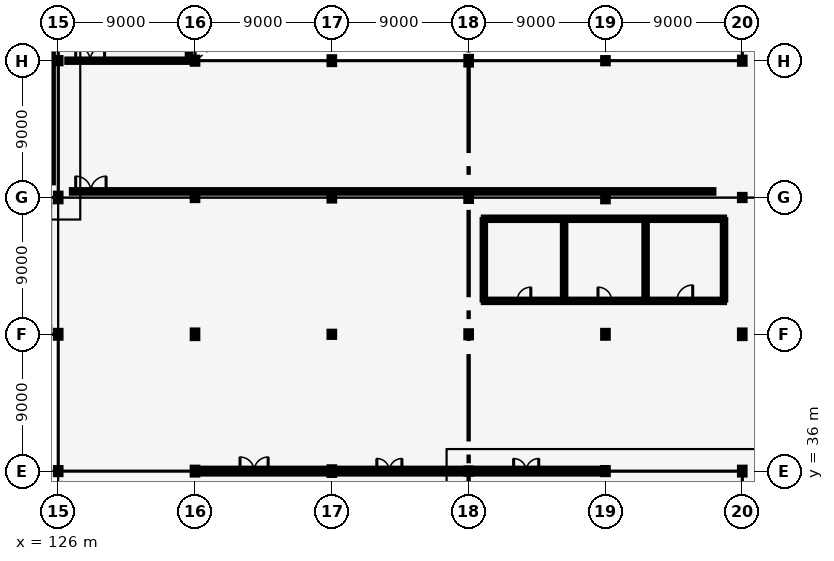
"""IFC4 building model, lengths in metres.
Left out: names, types, materials, properties, quantities, classifications, styles, units other than length and angle.
Written with IfcOpenShell. Run it as: python <this file> out.ifc"""

import sys

from ifc_helpers import new_model, si_unit, direction, frame, frame_2d, origin, origin_2d, place, context, subcontext, project, spatial, rectangle, i_section, extrude, element, fill, save


model = new_model("IFC4")
c1 = context("Model", 3, precision=1e-05, world=origin(), true_north=direction((0.0, 1.0)))
c2 = subcontext(c1, "Body", "Model", "MODEL_VIEW")
j1 = project(units=[si_unit("LENGTHUNIT", "METRE"), si_unit("PLANEANGLEUNIT", "RADIAN")], contexts=[c1])
p1 = place(None, origin())
s1 = spatial("IfcSite", under=j1, at=p1, CompositionType="ELEMENT")
p2 = place(p1, origin())
s2 = spatial("IfcBuilding", under=s1, at=p2, CompositionType="ELEMENT")
p3 = place(p2, frame((0.0, 0.0, 18.0)))
s3 = spatial("IfcBuildingStorey", under=s2, at=p3, CompositionType="ELEMENT", Elevation=18.0)
p4 = place(p3, frame((126.0, 36.0, 0.0), z_axis=(0.0, 0.0, 1.0), x_axis=(1.0, 0.0, 0.0)))
e1 = element("IfcColumn", 1, at=p4, inside=s3, PredefinedType="COLUMN", context=c2, shape_type="SweptSolid", body=[
    extrude(i_section(OverallWidth=0.3, OverallDepth=0.4, WebThickness=0.013, FlangeThickness=0.024, FilletRadius=0.027, at=origin_2d()), origin(), (0.0, 0.0, 1.0), 4.8),
])
p5 = place(p3, frame((126.0, 45.0, 0.0), z_axis=(0.0, 0.0, 1.0), x_axis=(1.0, 0.0, 0.0)))
e2 = element("IfcColumn", 2, at=p5, inside=s3, PredefinedType="COLUMN", context=c2, shape_type="SweptSolid", body=[
    extrude(i_section(OverallWidth=0.3, OverallDepth=0.45, WebThickness=0.014, FlangeThickness=0.026, FilletRadius=0.027, at=origin_2d()), origin(), (0.0, 0.0, 1.0), 4.8),
])
p6 = place(p3, frame((126.0, 54.0, 0.0), z_axis=(0.0, 0.0, 1.0), x_axis=(1.0, 0.0, 0.0)))
e3 = element("IfcColumn", 3, at=p6, inside=s3, PredefinedType="COLUMN", context=c2, shape_type="SweptSolid", body=[
    extrude(i_section(OverallWidth=0.3, OverallDepth=0.5, WebThickness=0.014, FlangeThickness=0.028, FilletRadius=0.027, at=origin_2d()), origin(), (0.0, 0.0, 1.0), 4.8),
])
p7 = place(p3, frame((126.0, 63.0, 0.0), z_axis=(0.0, 0.0, 1.0), x_axis=(1.0, 0.0, 0.0)))
e4 = element("IfcColumn", 4, at=p7, inside=s3, PredefinedType="COLUMN", context=c2, shape_type="SweptSolid", body=[
    extrude(i_section(OverallWidth=0.3, OverallDepth=0.34, WebThickness=0.012, FlangeThickness=0.021, FilletRadius=0.027, at=origin_2d()), origin(), (0.0, 0.0, 1.0), 4.8),
])
p8 = place(p3, frame((135.0, 36.0, 0.0), z_axis=(0.0, 0.0, 1.0), x_axis=(1.0, 0.0, 0.0)))
e5 = element("IfcColumn", 5, at=p8, inside=s3, PredefinedType="COLUMN", context=c2, shape_type="SweptSolid", body=[
    extrude(i_section(OverallWidth=0.3, OverallDepth=0.45, WebThickness=0.014, FlangeThickness=0.026, FilletRadius=0.027, at=origin_2d()), origin(), (0.0, 0.0, 1.0), 4.8),
])
p9 = place(p3, frame((135.0, 45.0, 0.0), z_axis=(0.0, 0.0, 1.0), x_axis=(1.0, 0.0, 0.0)))
e6 = element("IfcColumn", 6, at=p9, inside=s3, PredefinedType="COLUMN", context=c2, shape_type="SweptSolid", body=[
    extrude(i_section(OverallWidth=0.3, OverallDepth=0.5, WebThickness=0.014, FlangeThickness=0.028, FilletRadius=0.027, at=origin_2d()), origin(), (0.0, 0.0, 1.0), 4.8),
])
p10 = place(p3, frame((135.0, 54.0, 0.0), z_axis=(0.0, 0.0, 1.0), x_axis=(1.0, 0.0, 0.0)))
e7 = element("IfcColumn", 7, at=p10, inside=s3, PredefinedType="COLUMN", context=c2, shape_type="SweptSolid", body=[
    extrude(i_section(OverallWidth=0.3, OverallDepth=0.34, WebThickness=0.012, FlangeThickness=0.021, FilletRadius=0.027, at=origin_2d()), origin(), (0.0, 0.0, 1.0), 4.8),
])
p11 = place(p3, frame((135.0, 63.0, 0.0), z_axis=(0.0, 0.0, 1.0), x_axis=(1.0, 0.0, 0.0)))
e8 = element("IfcColumn", 8, at=p11, inside=s3, PredefinedType="COLUMN", context=c2, shape_type="SweptSolid", body=[
    extrude(i_section(OverallWidth=0.3, OverallDepth=0.4, WebThickness=0.013, FlangeThickness=0.024, FilletRadius=0.027, at=origin_2d()), origin(), (0.0, 0.0, 1.0), 4.8),
])
p12 = place(p3, frame((144.0, 36.0, 0.0), z_axis=(0.0, 0.0, 1.0), x_axis=(1.0, 0.0, 0.0)))
e9 = element("IfcColumn", 9, at=p12, inside=s3, PredefinedType="COLUMN", context=c2, shape_type="SweptSolid", body=[
    extrude(i_section(OverallWidth=0.3, OverallDepth=0.5, WebThickness=0.014, FlangeThickness=0.028, FilletRadius=0.027, at=origin_2d()), origin(), (0.0, 0.0, 1.0), 4.8),
])
p13 = place(p3, frame((144.0, 45.0, 0.0), z_axis=(0.0, 0.0, 1.0), x_axis=(1.0, 0.0, 0.0)))
e10 = element("IfcColumn", 10, at=p13, inside=s3, PredefinedType="COLUMN", context=c2, shape_type="SweptSolid", body=[
    extrude(i_section(OverallWidth=0.3, OverallDepth=0.34, WebThickness=0.012, FlangeThickness=0.021, FilletRadius=0.027, at=origin_2d()), origin(), (0.0, 0.0, 1.0), 4.8),
])
p14 = place(p3, frame((144.0, 54.0, 0.0), z_axis=(0.0, 0.0, 1.0), x_axis=(1.0, 0.0, 0.0)))
e11 = element("IfcColumn", 11, at=p14, inside=s3, PredefinedType="COLUMN", context=c2, shape_type="SweptSolid", body=[
    extrude(i_section(OverallWidth=0.3, OverallDepth=0.4, WebThickness=0.013, FlangeThickness=0.024, FilletRadius=0.027, at=origin_2d()), origin(), (0.0, 0.0, 1.0), 4.8),
])
p15 = place(p3, frame((144.0, 63.0, 0.0), z_axis=(0.0, 0.0, 1.0), x_axis=(1.0, 0.0, 0.0)))
e12 = element("IfcColumn", 12, at=p15, inside=s3, PredefinedType="COLUMN", context=c2, shape_type="SweptSolid", body=[
    extrude(i_section(OverallWidth=0.3, OverallDepth=0.45, WebThickness=0.014, FlangeThickness=0.026, FilletRadius=0.027, at=origin_2d()), origin(), (0.0, 0.0, 1.0), 4.8),
])
p16 = place(p3, frame((153.0, 36.0, 0.0), z_axis=(0.0, 0.0, 1.0), x_axis=(1.0, 0.0, 0.0)))
e13 = element("IfcColumn", 13, at=p16, inside=s3, PredefinedType="COLUMN", context=c2, shape_type="SweptSolid", body=[
    extrude(i_section(OverallWidth=0.3, OverallDepth=0.34, WebThickness=0.012, FlangeThickness=0.021, FilletRadius=0.027, at=origin_2d()), origin(), (0.0, 0.0, 1.0), 4.8),
])
p17 = place(p3, frame((153.0, 45.0, 0.0), z_axis=(0.0, 0.0, 1.0), x_axis=(1.0, 0.0, 0.0)))
e14 = element("IfcColumn", 14, at=p17, inside=s3, PredefinedType="COLUMN", context=c2, shape_type="SweptSolid", body=[
    extrude(i_section(OverallWidth=0.3, OverallDepth=0.4, WebThickness=0.013, FlangeThickness=0.024, FilletRadius=0.027, at=origin_2d()), origin(), (0.0, 0.0, 1.0), 4.8),
])
p18 = place(p3, frame((153.0, 54.0, 0.0), z_axis=(0.0, 0.0, 1.0), x_axis=(1.0, 0.0, 0.0)))
e15 = element("IfcColumn", 15, at=p18, inside=s3, PredefinedType="COLUMN", context=c2, shape_type="SweptSolid", body=[
    extrude(i_section(OverallWidth=0.3, OverallDepth=0.45, WebThickness=0.014, FlangeThickness=0.026, FilletRadius=0.027, at=origin_2d()), origin(), (0.0, 0.0, 1.0), 4.8),
])
p19 = place(p3, frame((153.0, 63.0, 0.0), z_axis=(0.0, 0.0, 1.0), x_axis=(1.0, 0.0, 0.0)))
e16 = element("IfcColumn", 16, at=p19, inside=s3, PredefinedType="COLUMN", context=c2, shape_type="SweptSolid", body=[
    extrude(i_section(OverallWidth=0.3, OverallDepth=0.5, WebThickness=0.014, FlangeThickness=0.028, FilletRadius=0.027, at=origin_2d()), origin(), (0.0, 0.0, 1.0), 4.8),
])
p20 = place(p3, frame((162.0, 36.0, 0.0), z_axis=(0.0, 0.0, 1.0), x_axis=(1.0, 0.0, 0.0)))
e17 = element("IfcColumn", 17, at=p20, inside=s3, PredefinedType="COLUMN", context=c2, shape_type="SweptSolid", body=[
    extrude(i_section(OverallWidth=0.3, OverallDepth=0.4, WebThickness=0.013, FlangeThickness=0.024, FilletRadius=0.027, at=origin_2d()), origin(), (0.0, 0.0, 1.0), 4.8),
])
p21 = place(p3, frame((162.0, 45.0, 0.0), z_axis=(0.0, 0.0, 1.0), x_axis=(1.0, 0.0, 0.0)))
e18 = element("IfcColumn", 18, at=p21, inside=s3, PredefinedType="COLUMN", context=c2, shape_type="SweptSolid", body=[
    extrude(i_section(OverallWidth=0.3, OverallDepth=0.45, WebThickness=0.014, FlangeThickness=0.026, FilletRadius=0.027, at=origin_2d()), origin(), (0.0, 0.0, 1.0), 4.8),
])
p22 = place(p3, frame((162.0, 54.0, 0.0), z_axis=(0.0, 0.0, 1.0), x_axis=(1.0, 0.0, 0.0)))
e19 = element("IfcColumn", 19, at=p22, inside=s3, PredefinedType="COLUMN", context=c2, shape_type="SweptSolid", body=[
    extrude(i_section(OverallWidth=0.3, OverallDepth=0.5, WebThickness=0.014, FlangeThickness=0.028, FilletRadius=0.027, at=origin_2d()), origin(), (0.0, 0.0, 1.0), 4.8),
])
p23 = place(p3, frame((162.0, 63.0, 0.0), z_axis=(0.0, 0.0, 1.0), x_axis=(1.0, 0.0, 0.0)))
e20 = element("IfcColumn", 20, at=p23, inside=s3, PredefinedType="COLUMN", context=c2, shape_type="SweptSolid", body=[
    extrude(i_section(OverallWidth=0.3, OverallDepth=0.34, WebThickness=0.012, FlangeThickness=0.021, FilletRadius=0.027, at=origin_2d()), origin(), (0.0, 0.0, 1.0), 4.8),
])
p24 = place(p3, frame((171.0, 36.0, 0.0), z_axis=(0.0, 0.0, 1.0), x_axis=(1.0, 0.0, 0.0)))
e21 = element("IfcColumn", 21, at=p24, inside=s3, PredefinedType="COLUMN", context=c2, shape_type="SweptSolid", body=[
    extrude(i_section(OverallWidth=0.3, OverallDepth=0.45, WebThickness=0.014, FlangeThickness=0.026, FilletRadius=0.027, at=origin_2d()), origin(), (0.0, 0.0, 1.0), 4.8),
])
p25 = place(p3, frame((171.0, 45.0, 0.0), z_axis=(0.0, 0.0, 1.0), x_axis=(1.0, 0.0, 0.0)))
e22 = element("IfcColumn", 22, at=p25, inside=s3, PredefinedType="COLUMN", context=c2, shape_type="SweptSolid", body=[
    extrude(i_section(OverallWidth=0.3, OverallDepth=0.5, WebThickness=0.014, FlangeThickness=0.028, FilletRadius=0.027, at=origin_2d()), origin(), (0.0, 0.0, 1.0), 4.8),
])
p26 = place(p3, frame((171.0, 54.0, 0.0), z_axis=(0.0, 0.0, 1.0), x_axis=(1.0, 0.0, 0.0)))
e23 = element("IfcColumn", 23, at=p26, inside=s3, PredefinedType="COLUMN", context=c2, shape_type="SweptSolid", body=[
    extrude(i_section(OverallWidth=0.3, OverallDepth=0.34, WebThickness=0.012, FlangeThickness=0.021, FilletRadius=0.027, at=origin_2d()), origin(), (0.0, 0.0, 1.0), 4.8),
])
p27 = place(p3, frame((171.0, 63.0, 0.0), z_axis=(0.0, 0.0, 1.0), x_axis=(1.0, 0.0, 0.0)))
e24 = element("IfcColumn", 24, at=p27, inside=s3, PredefinedType="COLUMN", context=c2, shape_type="SweptSolid", body=[
    extrude(i_section(OverallWidth=0.3, OverallDepth=0.4, WebThickness=0.013, FlangeThickness=0.024, FilletRadius=0.027, at=origin_2d()), origin(), (0.0, 0.0, 1.0), 4.8),
])
p28 = place(p3, frame((135.145, 36.0, 0.0), z_axis=(0.0, 0.0, 1.0), x_axis=(1.0, 0.0, 0.0)))
e25 = element("IfcWall", 25, at=p28, inside=s3, PredefinedType="SOLIDWALL", context=c2, shape_type="SweptSolid", body=[
    extrude(rectangle(XDim=8.71, YDim=0.32, at=frame_2d((4.355, 0.0))), origin(), (0.0, 0.0, 1.0), 3.65),
])
p29 = place(p28, frame((2.815, 0.0, 0.0)))
e26 = element("IfcOpeningElement", 26, at=p29, cuts=e25, PredefinedType="OPENING", context=c2, shape_type="SweptSolid", body=[
    extrude(rectangle(XDim=1.85, YDim=2.3, at=frame_2d((0.925, 1.15))), frame((0.0, 0.17, 0.0), z_axis=(0.0, -1.0, 0.0), x_axis=(1.0, 0.0, 0.0)), (0.0, 0.0, 1.0), 0.34),
])
p30 = place(p28, frame((5.415, 0.0, 0.85)))
e27 = element("IfcOpeningElement", 27, at=p30, cuts=e25, PredefinedType="OPENING", context=c2, shape_type="SweptSolid", body=[
    extrude(rectangle(XDim=1.85, YDim=1.3, at=frame_2d((0.925, 0.65))), frame((0.0, 0.17, 0.0), z_axis=(0.0, -1.0, 0.0), x_axis=(1.0, 0.0, 0.0)), (0.0, 0.0, 1.0), 0.34),
])
p31 = place(p3, frame((144.145, 36.0, 0.0), z_axis=(0.0, 0.0, 1.0), x_axis=(1.0, 0.0, 0.0)))
e28 = element("IfcWall", 28, at=p31, inside=s3, PredefinedType="SOLIDWALL", context=c2, shape_type="SweptSolid", body=[
    extrude(rectangle(XDim=8.71, YDim=0.32, at=frame_2d((4.355, 0.0))), origin(), (0.0, 0.0, 1.0), 3.65),
])
p32 = place(p31, frame((2.815, 0.0, 0.0)))
e29 = element("IfcOpeningElement", 29, at=p32, cuts=e28, PredefinedType="OPENING", context=c2, shape_type="SweptSolid", body=[
    extrude(rectangle(XDim=1.65, YDim=2.25, at=frame_2d((0.825, 1.125))), frame((0.0, 0.17, 0.0), z_axis=(0.0, -1.0, 0.0), x_axis=(1.0, 0.0, 0.0)), (0.0, 0.0, 1.0), 0.34),
])
p33 = place(p31, frame((5.415, 0.0, 0.85)))
e30 = element("IfcOpeningElement", 30, at=p33, cuts=e28, PredefinedType="OPENING", context=c2, shape_type="SweptSolid", body=[
    extrude(rectangle(XDim=1.45, YDim=1.25, at=frame_2d((0.725, 0.625))), frame((0.0, 0.17, 0.0), z_axis=(0.0, -1.0, 0.0), x_axis=(1.0, 0.0, 0.0)), (0.0, 0.0, 1.0), 0.34),
])
p34 = place(p3, frame((153.145, 36.0, 0.0), z_axis=(0.0, 0.0, 1.0), x_axis=(1.0, 0.0, 0.0)))
e31 = element("IfcWall", 31, at=p34, inside=s3, PredefinedType="SOLIDWALL", context=c2, shape_type="SweptSolid", body=[
    extrude(rectangle(XDim=8.71, YDim=0.32, at=frame_2d((4.355, 0.0))), origin(), (0.0, 0.0, 1.0), 3.65),
])
p35 = place(p34, frame((2.815, 0.0, 0.0)))
e32 = element("IfcOpeningElement", 32, at=p35, cuts=e31, PredefinedType="OPENING", context=c2, shape_type="SweptSolid", body=[
    extrude(rectangle(XDim=1.65, YDim=2.25, at=frame_2d((0.825, 1.125))), frame((0.0, 0.17, 0.0), z_axis=(0.0, -1.0, 0.0), x_axis=(1.0, 0.0, 0.0)), (0.0, 0.0, 1.0), 0.34),
])
p36 = place(p34, frame((5.415, 0.0, 0.85)))
e33 = element("IfcOpeningElement", 33, at=p36, cuts=e31, PredefinedType="OPENING", context=c2, shape_type="SweptSolid", body=[
    extrude(rectangle(XDim=2.4, YDim=1.6, at=frame_2d((1.2, 0.8))), frame((0.0, 0.17, 0.0), z_axis=(0.0, -1.0, 0.0), x_axis=(1.0, 0.0, 0.0)), (0.0, 0.0, 1.0), 0.34),
])
p37 = place(p3, frame((125.55, 55.0, 0.09), z_axis=(0.0, 0.0, 1.0), x_axis=(0.0, 1.0, 0.0)))
e34 = element("IfcWall", 34, at=p37, inside=s3, PredefinedType="PARAPET", context=c2, shape_type="SweptSolid", body=[
    extrude(rectangle(XDim=79.0, YDim=0.195, at=frame_2d((39.5, 0.0))), origin(), (0.0, 0.0, 1.0), 0.49),
])
p38 = place(p3, frame((154.0, 47.2, 0.0), z_axis=(0.0, 0.0, 1.0), x_axis=(1.0, 0.0, 0.0)))
e35 = element("IfcWall", 35, at=p38, inside=s3, PredefinedType="PLUMBINGWALL", context=c2, shape_type="SweptSolid", body=[
    extrude(rectangle(XDim=15.8, YDim=0.16, at=frame_2d((7.9, 0.0))), origin(), (0.0, 0.0, 1.0), 3.6),
])
p39 = place(p38, frame((2.19, 0.0, 0.0)))
e36 = element("IfcOpeningElement", 36, at=p39, cuts=e35, PredefinedType="OPENING", context=c2, shape_type="SweptSolid", body=[
    extrude(rectangle(XDim=0.9, YDim=2.1, at=frame_2d((0.45, 1.05))), frame((0.0, 0.09, 0.0), z_axis=(0.0, -1.0, 0.0), x_axis=(1.0, 0.0, 0.0)), (0.0, 0.0, 1.0), 0.18),
])
p40 = place(p38, frame((7.51, 0.0, 0.0)))
e37 = element("IfcOpeningElement", 37, at=p40, cuts=e35, PredefinedType="OPENING", context=c2, shape_type="SweptSolid", body=[
    extrude(rectangle(XDim=0.9, YDim=2.1, at=frame_2d((0.45, 1.05))), frame((0.0, 0.09, 0.0), z_axis=(0.0, -1.0, 0.0), x_axis=(1.0, 0.0, 0.0)), (0.0, 0.0, 1.0), 0.18),
])
p41 = place(p38, frame((12.7, 0.0, 0.0)))
e38 = element("IfcOpeningElement", 38, at=p41, cuts=e35, PredefinedType="OPENING", context=c2, shape_type="SweptSolid", body=[
    extrude(rectangle(XDim=1.04, YDim=2.15, at=frame_2d((0.52, 1.075))), frame((0.0, 0.09, 0.0), z_axis=(0.0, -1.0, 0.0), x_axis=(1.0, 0.0, 0.0)), (0.0, 0.0, 1.0), 0.18),
])
p42 = place(p3, frame((154.0, 52.6, 0.0), z_axis=(0.0, 0.0, 1.0), x_axis=(1.0, 0.0, 0.0)))
e39 = element("IfcWall", 39, at=p42, inside=s3, PredefinedType="PLUMBINGWALL", context=c2, shape_type="SweptSolid", body=[
    extrude(rectangle(XDim=15.8, YDim=0.16, at=frame_2d((7.9, 0.0))), origin(), (0.0, 0.0, 1.0), 3.6),
])
for number, where, z_axis, x_axis in (
    (40, (154.0, 47.288, 0.0), (0.0, 0.0, 1.0), (0.0, 1.0, 0.0)),
    (41, (159.28, 47.288, 0.0), (0.0, 0.0, 1.0), (0.0, 1.0, 0.0)),
    (42, (164.64, 47.288, 0.0), (0.0, 0.0, 1.0), (0.0, 1.0, 0.0)),
    (43, (169.8, 47.288, 0.0), (0.0, 0.0, 1.0), (0.0, 1.0, 0.0)),
):
    element("IfcWall", number, at=place(p3, frame(where, z_axis=z_axis, x_axis=x_axis)), inside=s3, PredefinedType="PLUMBINGWALL", context=c2, shape_type="SweptSolid", body=[
        extrude(rectangle(XDim=5.224, YDim=0.16, at=frame_2d((2.612, 0.0))), origin(), (0.0, 0.0, 1.0), 3.6),
    ])
p43 = place(p3, frame((126.9, 54.4, 0.0), z_axis=(0.0, 0.0, 1.0), x_axis=(1.0, 0.0, 0.0)))
e44 = element("IfcWall", 44, at=p43, inside=s3, PredefinedType="PARTITIONING", context=c2, shape_type="SweptSolid", body=[
    extrude(rectangle(XDim=42.2, YDim=0.17, at=frame_2d((21.1, 0.0))), origin(), (0.0, 0.0, 1.0), 3.6),
])
p44 = place(p43, frame((0.25, 0.0, 0.0)))
e45 = element("IfcOpeningElement", 45, at=p44, cuts=e44, PredefinedType="OPENING", context=c2, shape_type="SweptSolid", body=[
    extrude(rectangle(XDim=2.0, YDim=2.45, at=frame_2d((1.0, 1.225))), frame((0.0, 0.095, 0.0), z_axis=(0.0, -1.0, 0.0), x_axis=(1.0, 0.0, 0.0)), (0.0, 0.0, 1.0), 0.19),
])
p45 = place(p3, frame((126.6, 63.0, 0.0), z_axis=(0.0, 0.0, 1.0), x_axis=(1.0, 0.0, 0.0)))
e46 = element("IfcWall", 46, at=p45, inside=s3, PredefinedType="PARTITIONING", context=c2, shape_type="SweptSolid", body=[
    extrude(rectangle(XDim=8.0, YDim=0.155, at=frame_2d((4.0, 0.0))), origin(), (0.0, 0.0, 1.0), 3.6),
])
p46 = place(p45, frame((0.55, 0.0, 0.0)))
e47 = element("IfcOpeningElement", 47, at=p46, cuts=e46, PredefinedType="OPENING", context=c2, shape_type="SweptSolid", body=[
    extrude(rectangle(XDim=1.9, YDim=2.4, at=frame_2d((0.95, 1.2))), frame((0.0, 0.087, 0.0), z_axis=(0.0, -1.0, 0.0), x_axis=(1.0, 0.0, 0.0)), (0.0, 0.0, 1.0), 0.175),
])
p47 = place(p3, frame((134.6, 63.093, 0.0), z_axis=(0.0, 0.0, 1.0), x_axis=(0.0, 1.0, 0.0)))
e48 = element("IfcWall", 48, at=p47, inside=s3, PredefinedType="PARTITIONING", context=c2, shape_type="SweptSolid", body=[
    extrude(rectangle(XDim=17.614, YDim=0.155, at=frame_2d((8.807, 0.0))), origin(), (0.0, 0.0, 1.0), 3.6),
])
p48 = place(p29, origin())
e49 = element("IfcDoor", 49, at=p48, inside=s3, OperationType="DOUBLE_DOOR_SINGLE_SWING", PredefinedType="DOOR", context=c2, shape_type="SweptSolid", body=[
    extrude(rectangle(XDim=1.85, YDim=2.3, at=frame_2d((0.925, 1.15))), frame((0.0, 0.025, 0.0), z_axis=(0.0, -1.0, 0.0), x_axis=(1.0, 0.0, 0.0)), (0.0, 0.0, 1.0), 0.05),
])
fill(e26, e49)
p49 = place(p30, origin())
e50 = element("IfcWindow", 50, at=p49, inside=s3, PartitioningType="SINGLE_PANEL", PredefinedType="WINDOW", context=c2, shape_type="SweptSolid", body=[
    extrude(rectangle(XDim=1.85, YDim=1.3, at=frame_2d((0.925, 0.65))), frame((0.0, 0.03, 0.0), z_axis=(0.0, -1.0, 0.0), x_axis=(1.0, 0.0, 0.0)), (0.0, 0.0, 1.0), 0.06),
])
fill(e27, e50)
p50 = place(p32, origin())
e51 = element("IfcDoor", 51, at=p50, inside=s3, OperationType="DOUBLE_DOOR_SINGLE_SWING", PredefinedType="DOOR", context=c2, shape_type="SweptSolid", body=[
    extrude(rectangle(XDim=1.65, YDim=2.25, at=frame_2d((0.825, 1.125))), frame((0.0, 0.025, 0.0), z_axis=(0.0, -1.0, 0.0), x_axis=(1.0, 0.0, 0.0)), (0.0, 0.0, 1.0), 0.05),
])
fill(e29, e51)
p51 = place(p33, origin())
e52 = element("IfcWindow", 52, at=p51, inside=s3, PartitioningType="SINGLE_PANEL", PredefinedType="WINDOW", context=c2, shape_type="SweptSolid", body=[
    extrude(rectangle(XDim=1.45, YDim=1.25, at=frame_2d((0.725, 0.625))), frame((0.0, 0.03, 0.0), z_axis=(0.0, -1.0, 0.0), x_axis=(1.0, 0.0, 0.0)), (0.0, 0.0, 1.0), 0.06),
])
fill(e30, e52)
p52 = place(p35, origin())
e53 = element("IfcDoor", 53, at=p52, inside=s3, OperationType="DOUBLE_DOOR_SINGLE_SWING", PredefinedType="DOOR", context=c2, shape_type="SweptSolid", body=[
    extrude(rectangle(XDim=1.65, YDim=2.25, at=frame_2d((0.825, 1.125))), frame((0.0, 0.025, 0.0), z_axis=(0.0, -1.0, 0.0), x_axis=(1.0, 0.0, 0.0)), (0.0, 0.0, 1.0), 0.05),
])
fill(e32, e53)
p53 = place(p36, origin())
e54 = element("IfcWindow", 54, at=p53, inside=s3, PartitioningType="SINGLE_PANEL", PredefinedType="WINDOW", context=c2, shape_type="SweptSolid", body=[
    extrude(rectangle(XDim=2.4, YDim=1.6, at=frame_2d((1.2, 0.8))), frame((0.0, 0.03, 0.0), z_axis=(0.0, -1.0, 0.0), x_axis=(1.0, 0.0, 0.0)), (0.0, 0.0, 1.0), 0.06),
])
fill(e33, e54)
p54 = place(p39, origin())
e55 = element("IfcDoor", 55, at=p54, inside=s3, OperationType="SINGLE_SWING_RIGHT", PredefinedType="DOOR", context=c2, shape_type="SweptSolid", body=[
    extrude(rectangle(XDim=0.9, YDim=2.1, at=frame_2d((0.45, 1.05))), frame((0.0, 0.025, 0.0), z_axis=(0.0, -1.0, 0.0), x_axis=(1.0, 0.0, 0.0)), (0.0, 0.0, 1.0), 0.05),
])
fill(e36, e55)
p55 = place(p40, origin())
e56 = element("IfcDoor", 56, at=p55, inside=s3, OperationType="SINGLE_SWING_LEFT", PredefinedType="DOOR", context=c2, shape_type="SweptSolid", body=[
    extrude(rectangle(XDim=0.9, YDim=2.1, at=frame_2d((0.45, 1.05))), frame((0.0, 0.025, 0.0), z_axis=(0.0, -1.0, 0.0), x_axis=(1.0, 0.0, 0.0)), (0.0, 0.0, 1.0), 0.05),
])
fill(e37, e56)
p56 = place(p41, origin())
e57 = element("IfcDoor", 57, at=p56, inside=s3, OperationType="SINGLE_SWING_RIGHT", PredefinedType="DOOR", context=c2, shape_type="SweptSolid", body=[
    extrude(rectangle(XDim=1.04, YDim=2.15, at=frame_2d((0.52, 1.075))), frame((0.0, 0.025, 0.0), z_axis=(0.0, -1.0, 0.0), x_axis=(1.0, 0.0, 0.0)), (0.0, 0.0, 1.0), 0.05),
])
fill(e38, e57)
p57 = place(p44, origin())
e58 = element("IfcDoor", 58, at=p57, inside=s3, OperationType="DOUBLE_DOOR_SINGLE_SWING", PredefinedType="DOOR", context=c2, shape_type="SweptSolid", body=[
    extrude(rectangle(XDim=2.0, YDim=2.45, at=frame_2d((1.0, 1.225))), frame((0.0, 0.025, 0.0), z_axis=(0.0, -1.0, 0.0), x_axis=(1.0, 0.0, 0.0)), (0.0, 0.0, 1.0), 0.05),
])
fill(e45, e58)
p58 = place(p46, origin())
e59 = element("IfcDoor", 59, at=p58, inside=s3, OperationType="DOUBLE_DOOR_SINGLE_SWING", PredefinedType="DOOR", context=c2, shape_type="SweptSolid", body=[
    extrude(rectangle(XDim=1.9, YDim=2.4, at=frame_2d((0.95, 1.2))), frame((0.0, 0.025, 0.0), z_axis=(0.0, -1.0, 0.0), x_axis=(1.0, 0.0, 0.0)), (0.0, 0.0, 1.0), 0.05),
])
fill(e47, e59)
save(model, sys.argv[1])
